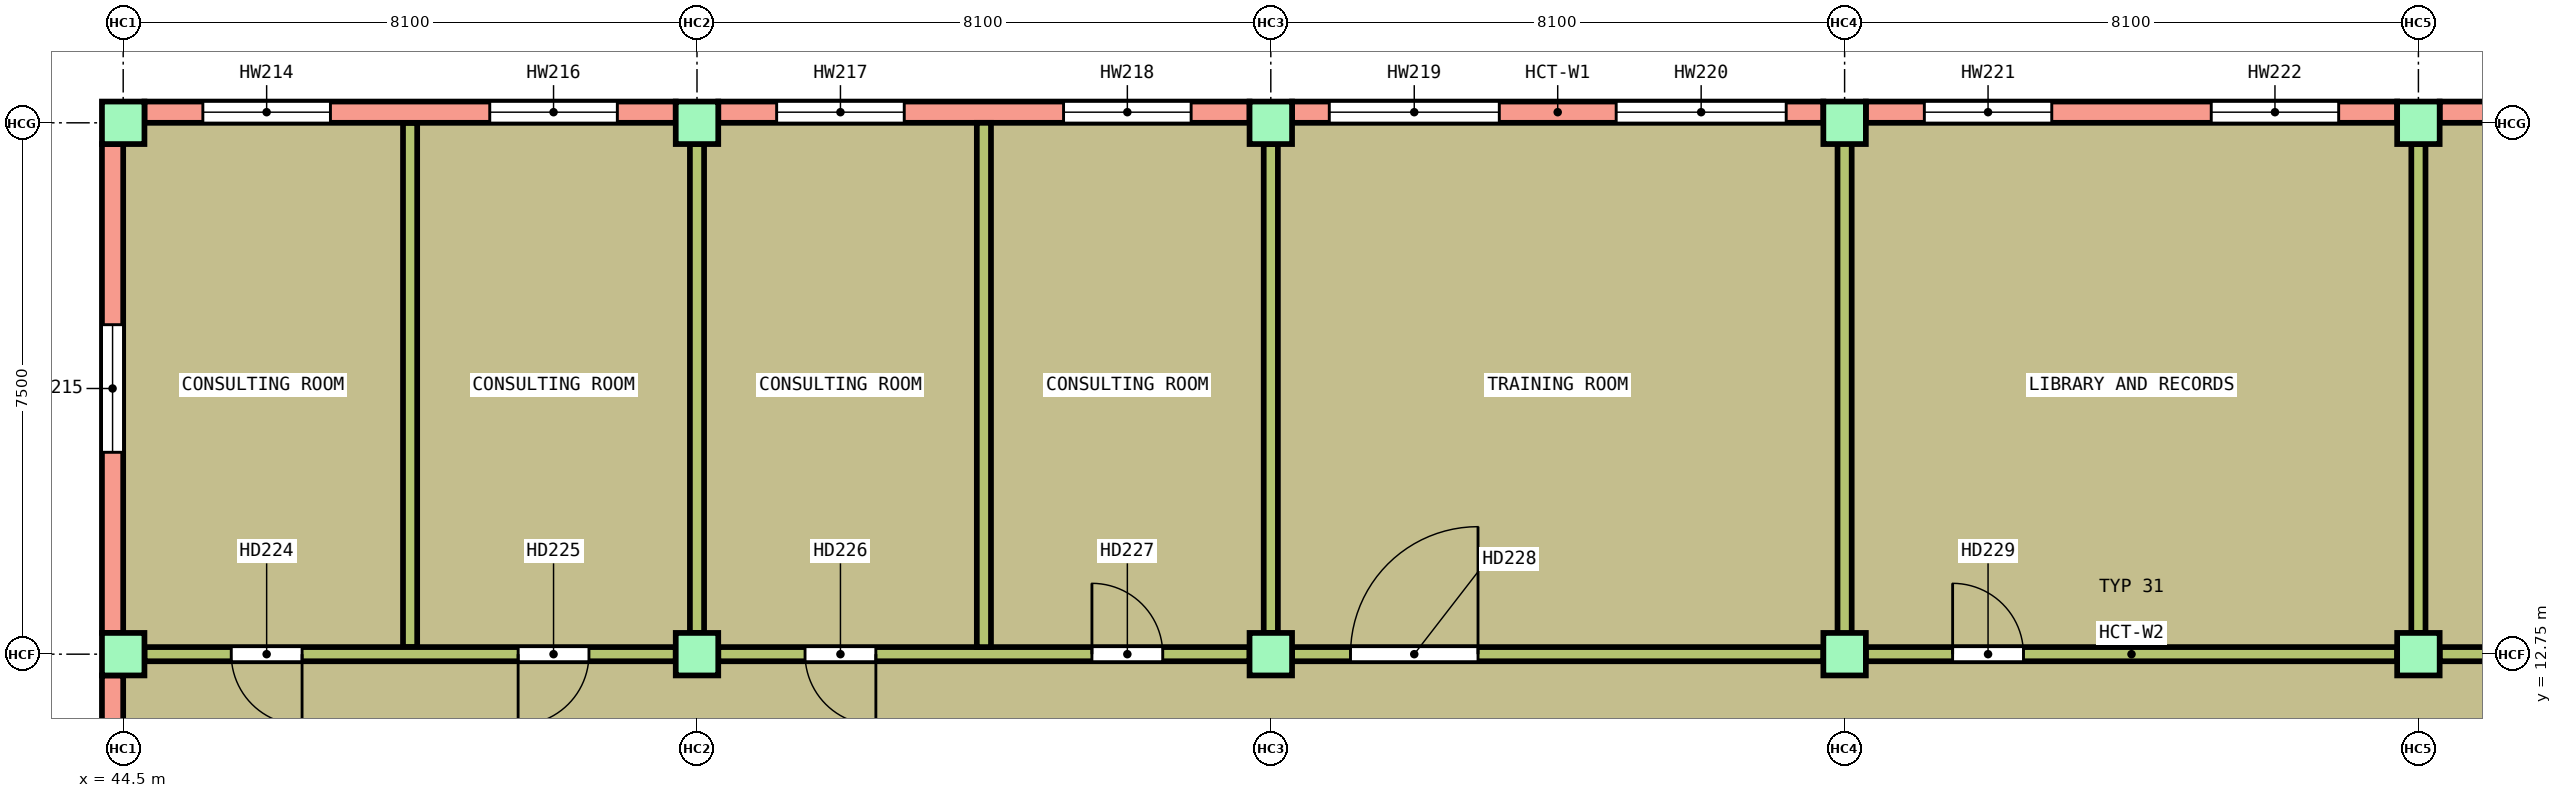
"""IFC4 building model, lengths in metres.
Left out: names, types, materials, properties, quantities, classifications, styles, units other than length and angle.
Written with IfcOpenShell. Run it as: python <this file> out.ifc"""

import sys

from ifc_helpers import new_model, si_unit, direction, frame, frame_2d, origin, origin_2d, place, context, subcontext, project, spatial, rectangle, extrude, element, fill, save


model = new_model("IFC4")
c1 = context("Model", 3, precision=1e-05, world=origin(), true_north=direction((0.0, 1.0)))
c2 = subcontext(c1, "Body", "Model", "MODEL_VIEW")
j1 = project(units=[si_unit("LENGTHUNIT", "METRE"), si_unit("PLANEANGLEUNIT", "RADIAN")], contexts=[c1])
p1 = place(None, origin())
s1 = spatial("IfcSite", under=j1, at=p1, CompositionType="ELEMENT")
p2 = place(p1, origin())
s2 = spatial("IfcBuilding", under=s1, at=p2, CompositionType="ELEMENT")
p3 = place(p2, frame((0.0, 0.0, 10.2)))
s3 = spatial("IfcBuildingStorey", under=s2, at=p3, CompositionType="ELEMENT", Elevation=10.2)
for number, where, z_axis, x_axis in (
    (1, (44.5, 12.75, 0.0), (0.0, 0.0, 1.0), (1.0, 0.0, 0.0)),
    (2, (52.6, 12.75, 0.0), (0.0, 0.0, 1.0), (1.0, 0.0, 0.0)),
    (3, (60.7, 12.75, 0.0), (0.0, 0.0, 1.0), (1.0, 0.0, 0.0)),
    (4, (68.8, 12.75, 0.0), (0.0, 0.0, 1.0), (1.0, 0.0, 0.0)),
    (5, (76.9, 12.75, 0.0), (0.0, 0.0, 1.0), (1.0, 0.0, 0.0)),
    (6, (44.5, 20.25, 0.0), (0.0, 0.0, 1.0), (1.0, 0.0, 0.0)),
    (7, (52.6, 20.25, 0.0), (0.0, 0.0, 1.0), (1.0, 0.0, 0.0)),
    (8, (60.7, 20.25, 0.0), (0.0, 0.0, 1.0), (1.0, 0.0, 0.0)),
    (9, (68.8, 20.25, 0.0), (0.0, 0.0, 1.0), (1.0, 0.0, 0.0)),
    (10, (76.9, 20.25, 0.0), (0.0, 0.0, 1.0), (1.0, 0.0, 0.0)),
):
    element("IfcColumn", number, at=place(p3, frame(where, z_axis=z_axis, x_axis=x_axis)), inside=s3, PredefinedType="COLUMN", context=c2, shape_type="SweptSolid", body=[
        extrude(rectangle(XDim=0.6, YDim=0.6, at=origin_2d()), origin(), (0.0, 0.0, 1.0), 4.15),
    ])
p4 = place(p3, frame((44.35, 10.05, 0.0), z_axis=(0.0, 0.0, 1.0), x_axis=(0.0, 1.0, 0.0)))
e11 = element("IfcWall", 11, at=p4, inside=s3, PredefinedType="SOLIDWALL", context=c2, shape_type="SweptSolid", body=[
    extrude(rectangle(XDim=2.4, YDim=0.3, at=frame_2d((1.2, 0.0))), origin(), (0.0, 0.0, 1.0), 3.6),
])
p5 = place(p3, frame((44.35, 13.05, 0.0), z_axis=(0.0, 0.0, 1.0), x_axis=(0.0, 1.0, 0.0)))
e12 = element("IfcWall", 12, at=p5, inside=s3, PredefinedType="SOLIDWALL", context=c2, shape_type="SweptSolid", body=[
    extrude(rectangle(XDim=6.9, YDim=0.3, at=frame_2d((3.45, 0.0))), origin(), (0.0, 0.0, 1.0), 3.6),
])
p6 = place(p5, frame((2.55, 0.0, 0.9)))
e13 = element("IfcOpeningElement", 13, at=p6, cuts=e12, PredefinedType="OPENING", context=c2, shape_type="SweptSolid", body=[
    extrude(rectangle(XDim=1.8, YDim=1.8, at=frame_2d((0.9, 0.9))), frame((0.0, 0.16, 0.0), z_axis=(0.0, -1.0, 0.0), x_axis=(1.0, 0.0, 0.0)), (0.0, 0.0, 1.0), 0.32),
])
p7 = place(p3, frame((48.55, 12.85, 0.0), z_axis=(0.0, 0.0, 1.0), x_axis=(0.0, 1.0, 0.0)))
e14 = element("IfcWall", 14, at=p7, inside=s3, PredefinedType="PARTITIONING", context=c2, shape_type="SweptSolid", body=[
    extrude(rectangle(XDim=7.4, YDim=0.2, at=frame_2d((3.7, 0.0))), origin(), (0.0, 0.0, 1.0), 3.6),
])
p8 = place(p3, frame((60.7, 13.05, 0.0), z_axis=(0.0, 0.0, 1.0), x_axis=(0.0, 1.0, 0.0)))
e15 = element("IfcWall", 15, at=p8, inside=s3, PredefinedType="PARTITIONING", context=c2, shape_type="SweptSolid", body=[
    extrude(rectangle(XDim=6.9, YDim=0.2, at=frame_2d((3.45, 0.0))), origin(), (0.0, 0.0, 1.0), 3.6),
])
p9 = place(p3, frame((68.8, 12.75, 0.0), z_axis=(0.0, 0.0, 1.0), x_axis=(0.0, 1.0, 0.0)))
e16 = element("IfcWall", 16, at=p9, inside=s3, PredefinedType="PARTITIONING", context=c2, shape_type="SweptSolid", body=[
    extrude(rectangle(XDim=7.5, YDim=0.2, at=frame_2d((3.75, 0.0))), origin(), (0.0, 0.0, 1.0), 3.6),
])
for number, where, z_axis, x_axis in (
    (17, (76.9, 13.05, 0.0), (0.0, 0.0, 1.0), (0.0, 1.0, 0.0)),
    (18, (52.6, 13.05, 0.0), (0.0, 0.0, 1.0), (0.0, 1.0, 0.0)),
):
    element("IfcWall", number, at=place(p3, frame(where, z_axis=z_axis, x_axis=x_axis)), inside=s3, PredefinedType="PARTITIONING", context=c2, shape_type="SweptSolid", body=[
        extrude(rectangle(XDim=6.9, YDim=0.2, at=frame_2d((3.45, 0.0))), origin(), (0.0, 0.0, 1.0), 3.6),
    ])
p10 = place(p3, frame((44.8, 12.75, 0.0), z_axis=(0.0, 0.0, 1.0), x_axis=(1.0, 0.0, 0.0)))
e19 = element("IfcWall", 19, at=p10, inside=s3, PredefinedType="PARTITIONING", context=c2, shape_type="SweptSolid", body=[
    extrude(rectangle(XDim=7.5, YDim=0.2, at=frame_2d((3.75, 0.0))), origin(), (0.0, 0.0, 1.0), 3.6),
])
p11 = place(p10, frame((1.225, 0.0, 0.0)))
e20 = element("IfcOpeningElement", 20, at=p11, cuts=e19, PredefinedType="OPENING", context=c2, shape_type="SweptSolid", body=[
    extrude(rectangle(XDim=1.0, YDim=2.1, at=frame_2d((0.5, 1.05))), frame((0.0, 0.11, 0.0), z_axis=(0.0, -1.0, 0.0), x_axis=(1.0, 0.0, 0.0)), (0.0, 0.0, 1.0), 0.22),
])
p12 = place(p10, frame((5.275, 0.0, 0.0)))
e21 = element("IfcOpeningElement", 21, at=p12, cuts=e19, PredefinedType="OPENING", context=c2, shape_type="SweptSolid", body=[
    extrude(rectangle(XDim=1.0, YDim=2.1, at=frame_2d((0.5, 1.05))), frame((0.0, 0.11, 0.0), z_axis=(0.0, -1.0, 0.0), x_axis=(1.0, 0.0, 0.0)), (0.0, 0.0, 1.0), 0.22),
])
p13 = place(p3, frame((52.9, 12.75, 0.0), z_axis=(0.0, 0.0, 1.0), x_axis=(1.0, 0.0, 0.0)))
e22 = element("IfcWall", 22, at=p13, inside=s3, PredefinedType="PARTITIONING", context=c2, shape_type="SweptSolid", body=[
    extrude(rectangle(XDim=7.5, YDim=0.2, at=frame_2d((3.75, 0.0))), origin(), (0.0, 0.0, 1.0), 3.6),
])
p14 = place(p13, frame((1.225, 0.0, 0.0)))
e23 = element("IfcOpeningElement", 23, at=p14, cuts=e22, PredefinedType="OPENING", context=c2, shape_type="SweptSolid", body=[
    extrude(rectangle(XDim=1.0, YDim=2.1, at=frame_2d((0.5, 1.05))), frame((0.0, 0.11, 0.0), z_axis=(0.0, -1.0, 0.0), x_axis=(1.0, 0.0, 0.0)), (0.0, 0.0, 1.0), 0.22),
])
p15 = place(p13, frame((5.275, 0.0, 0.0)))
e24 = element("IfcOpeningElement", 24, at=p15, cuts=e22, PredefinedType="OPENING", context=c2, shape_type="SweptSolid", body=[
    extrude(rectangle(XDim=1.0, YDim=2.1, at=frame_2d((0.5, 1.05))), frame((0.0, 0.11, 0.0), z_axis=(0.0, -1.0, 0.0), x_axis=(1.0, 0.0, 0.0)), (0.0, 0.0, 1.0), 0.22),
])
p16 = place(p3, frame((61.0, 12.75, 0.0), z_axis=(0.0, 0.0, 1.0), x_axis=(1.0, 0.0, 0.0)))
e25 = element("IfcWall", 25, at=p16, inside=s3, PredefinedType="PARTITIONING", context=c2, shape_type="SweptSolid", body=[
    extrude(rectangle(XDim=7.5, YDim=0.2, at=frame_2d((3.75, 0.0))), origin(), (0.0, 0.0, 1.0), 3.6),
])
p17 = place(p16, frame((0.825, 0.0, 0.0)))
e26 = element("IfcOpeningElement", 26, at=p17, cuts=e25, PredefinedType="OPENING", context=c2, shape_type="SweptSolid", body=[
    extrude(rectangle(XDim=1.8, YDim=2.1, at=frame_2d((0.9, 1.05))), frame((0.0, 0.11, 0.0), z_axis=(0.0, -1.0, 0.0), x_axis=(1.0, 0.0, 0.0)), (0.0, 0.0, 1.0), 0.22),
])
p18 = place(p3, frame((69.1, 12.75, 0.0), z_axis=(0.0, 0.0, 1.0), x_axis=(1.0, 0.0, 0.0)))
e27 = element("IfcWall", 27, at=p18, inside=s3, PredefinedType="PARTITIONING", context=c2, shape_type="SweptSolid", body=[
    extrude(rectangle(XDim=7.5, YDim=0.2, at=frame_2d((3.75, 0.0))), origin(), (0.0, 0.0, 1.0), 3.6),
])
p19 = place(p18, frame((1.225, 0.0, 0.0)))
e28 = element("IfcOpeningElement", 28, at=p19, cuts=e27, PredefinedType="OPENING", context=c2, shape_type="SweptSolid", body=[
    extrude(rectangle(XDim=1.0, YDim=2.1, at=frame_2d((0.5, 1.05))), frame((0.0, 0.11, 0.0), z_axis=(0.0, -1.0, 0.0), x_axis=(1.0, 0.0, 0.0)), (0.0, 0.0, 1.0), 0.22),
])
p20 = place(p3, frame((77.2, 12.75, 0.0), z_axis=(0.0, 0.0, 1.0), x_axis=(1.0, 0.0, 0.0)))
e29 = element("IfcWall", 29, at=p20, inside=s3, PredefinedType="PARTITIONING", context=c2, shape_type="SweptSolid", body=[
    extrude(rectangle(XDim=7.5, YDim=0.2, at=frame_2d((3.75, 0.0))), origin(), (0.0, 0.0, 1.0), 3.6),
])
p21 = place(p20, frame((1.225, 0.0, 0.0)))
e30 = element("IfcOpeningElement", 30, at=p21, cuts=e29, PredefinedType="OPENING", context=c2, shape_type="SweptSolid", body=[
    extrude(rectangle(XDim=1.0, YDim=2.1, at=frame_2d((0.5, 1.05))), frame((0.0, 0.11, 0.0), z_axis=(0.0, -1.0, 0.0), x_axis=(1.0, 0.0, 0.0)), (0.0, 0.0, 1.0), 0.22),
])
p22 = place(p3, frame((44.8, 20.4, 0.0), z_axis=(0.0, 0.0, 1.0), x_axis=(1.0, 0.0, 0.0)))
e31 = element("IfcWall", 31, at=p22, inside=s3, PredefinedType="SOLIDWALL", context=c2, shape_type="SweptSolid", body=[
    extrude(rectangle(XDim=7.5, YDim=0.3, at=frame_2d((3.75, 0.0))), origin(), (0.0, 0.0, 1.0), 3.6),
])
p23 = place(p22, frame((0.825, 0.0, 0.9)))
e32 = element("IfcOpeningElement", 32, at=p23, cuts=e31, PredefinedType="OPENING", context=c2, shape_type="SweptSolid", body=[
    extrude(rectangle(XDim=1.8, YDim=1.8, at=frame_2d((0.9, 0.9))), frame((0.0, 0.16, 0.0), z_axis=(0.0, -1.0, 0.0), x_axis=(1.0, 0.0, 0.0)), (0.0, 0.0, 1.0), 0.32),
])
p24 = place(p22, frame((4.875, 0.0, 0.9)))
e33 = element("IfcOpeningElement", 33, at=p24, cuts=e31, PredefinedType="OPENING", context=c2, shape_type="SweptSolid", body=[
    extrude(rectangle(XDim=1.8, YDim=1.8, at=frame_2d((0.9, 0.9))), frame((0.0, 0.16, 0.0), z_axis=(0.0, -1.0, 0.0), x_axis=(1.0, 0.0, 0.0)), (0.0, 0.0, 1.0), 0.32),
])
p25 = place(p3, frame((52.9, 20.4, 0.0), z_axis=(0.0, 0.0, 1.0), x_axis=(1.0, 0.0, 0.0)))
e34 = element("IfcWall", 34, at=p25, inside=s3, PredefinedType="SOLIDWALL", context=c2, shape_type="SweptSolid", body=[
    extrude(rectangle(XDim=7.5, YDim=0.3, at=frame_2d((3.75, 0.0))), origin(), (0.0, 0.0, 1.0), 3.6),
])
p26 = place(p25, frame((0.825, 0.0, 0.9)))
e35 = element("IfcOpeningElement", 35, at=p26, cuts=e34, PredefinedType="OPENING", context=c2, shape_type="SweptSolid", body=[
    extrude(rectangle(XDim=1.8, YDim=1.8, at=frame_2d((0.9, 0.9))), frame((0.0, 0.16, 0.0), z_axis=(0.0, -1.0, 0.0), x_axis=(1.0, 0.0, 0.0)), (0.0, 0.0, 1.0), 0.32),
])
p27 = place(p25, frame((4.875, 0.0, 0.9)))
e36 = element("IfcOpeningElement", 36, at=p27, cuts=e34, PredefinedType="OPENING", context=c2, shape_type="SweptSolid", body=[
    extrude(rectangle(XDim=1.8, YDim=1.8, at=frame_2d((0.9, 0.9))), frame((0.0, 0.16, 0.0), z_axis=(0.0, -1.0, 0.0), x_axis=(1.0, 0.0, 0.0)), (0.0, 0.0, 1.0), 0.32),
])
p28 = place(p3, frame((61.0, 20.4, 0.0), z_axis=(0.0, 0.0, 1.0), x_axis=(1.0, 0.0, 0.0)))
e37 = element("IfcWall", 37, at=p28, inside=s3, PredefinedType="SOLIDWALL", context=c2, shape_type="SweptSolid", body=[
    extrude(rectangle(XDim=7.5, YDim=0.3, at=frame_2d((3.75, 0.0))), origin(), (0.0, 0.0, 1.0), 3.6),
])
p29 = place(p28, frame((0.525, 0.0, 0.3)))
e38 = element("IfcOpeningElement", 38, at=p29, cuts=e37, PredefinedType="OPENING", context=c2, shape_type="SweptSolid", body=[
    extrude(rectangle(XDim=2.4, YDim=2.4, at=frame_2d((1.2, 1.2))), frame((0.0, 0.16, 0.0), z_axis=(0.0, -1.0, 0.0), x_axis=(1.0, 0.0, 0.0)), (0.0, 0.0, 1.0), 0.32),
])
p30 = place(p28, frame((4.575, 0.0, 0.3)))
e39 = element("IfcOpeningElement", 39, at=p30, cuts=e37, PredefinedType="OPENING", context=c2, shape_type="SweptSolid", body=[
    extrude(rectangle(XDim=2.4, YDim=2.4, at=frame_2d((1.2, 1.2))), frame((0.0, 0.16, 0.0), z_axis=(0.0, -1.0, 0.0), x_axis=(1.0, 0.0, 0.0)), (0.0, 0.0, 1.0), 0.32),
])
p31 = place(p3, frame((69.1, 20.4, 0.0), z_axis=(0.0, 0.0, 1.0), x_axis=(1.0, 0.0, 0.0)))
e40 = element("IfcWall", 40, at=p31, inside=s3, PredefinedType="SOLIDWALL", context=c2, shape_type="SweptSolid", body=[
    extrude(rectangle(XDim=7.5, YDim=0.3, at=frame_2d((3.75, 0.0))), origin(), (0.0, 0.0, 1.0), 3.6),
])
p32 = place(p31, frame((0.825, 0.0, 0.9)))
e41 = element("IfcOpeningElement", 41, at=p32, cuts=e40, PredefinedType="OPENING", context=c2, shape_type="SweptSolid", body=[
    extrude(rectangle(XDim=1.8, YDim=1.8, at=frame_2d((0.9, 0.9))), frame((0.0, 0.16, 0.0), z_axis=(0.0, -1.0, 0.0), x_axis=(1.0, 0.0, 0.0)), (0.0, 0.0, 1.0), 0.32),
])
p33 = place(p31, frame((4.875, 0.0, 0.9)))
e42 = element("IfcOpeningElement", 42, at=p33, cuts=e40, PredefinedType="OPENING", context=c2, shape_type="SweptSolid", body=[
    extrude(rectangle(XDim=1.8, YDim=1.8, at=frame_2d((0.9, 0.9))), frame((0.0, 0.16, 0.0), z_axis=(0.0, -1.0, 0.0), x_axis=(1.0, 0.0, 0.0)), (0.0, 0.0, 1.0), 0.32),
])
p34 = place(p3, frame((77.2, 20.4, 0.0), z_axis=(0.0, 0.0, 1.0), x_axis=(1.0, 0.0, 0.0)))
e43 = element("IfcWall", 43, at=p34, inside=s3, PredefinedType="SOLIDWALL", context=c2, shape_type="SweptSolid", body=[
    extrude(rectangle(XDim=7.5, YDim=0.3, at=frame_2d((3.75, 0.0))), origin(), (0.0, 0.0, 1.0), 3.6),
])
p35 = place(p34, frame((0.825, 0.0, 0.9)))
e44 = element("IfcOpeningElement", 44, at=p35, cuts=e43, PredefinedType="OPENING", context=c2, shape_type="SweptSolid", body=[
    extrude(rectangle(XDim=1.8, YDim=1.8, at=frame_2d((0.9, 0.9))), frame((0.0, 0.16, 0.0), z_axis=(0.0, -1.0, 0.0), x_axis=(1.0, 0.0, 0.0)), (0.0, 0.0, 1.0), 0.32),
])
p36 = place(p34, frame((4.875, 0.0, 0.9)))
e45 = element("IfcOpeningElement", 45, at=p36, cuts=e43, PredefinedType="OPENING", context=c2, shape_type="SweptSolid", body=[
    extrude(rectangle(XDim=1.8, YDim=1.8, at=frame_2d((0.9, 0.9))), frame((0.0, 0.16, 0.0), z_axis=(0.0, -1.0, 0.0), x_axis=(1.0, 0.0, 0.0)), (0.0, 0.0, 1.0), 0.32),
])
p37 = place(p3, frame((56.65, 12.85, 0.0), z_axis=(0.0, 0.0, 1.0), x_axis=(0.0, 1.0, 0.0)))
e46 = element("IfcWall", 46, at=p37, inside=s3, PredefinedType="PARTITIONING", context=c2, shape_type="SweptSolid", body=[
    extrude(rectangle(XDim=7.4, YDim=0.2, at=frame_2d((3.7, 0.0))), origin(), (0.0, 0.0, 1.0), 3.6),
])
p38 = place(p11, origin())
e47 = element("IfcDoor", 47, at=p38, inside=s3, OperationType="SINGLE_SWING_RIGHT", PredefinedType="DOOR", context=c2, shape_type="SweptSolid", body=[
    extrude(rectangle(XDim=1.0, YDim=2.1, at=frame_2d((0.5, 1.05))), frame((0.0, 0.025, 0.0), z_axis=(0.0, -1.0, 0.0), x_axis=(1.0, 0.0, 0.0)), (0.0, 0.0, 1.0), 0.05),
])
fill(e20, e47)
p39 = place(p12, origin())
e48 = element("IfcDoor", 48, at=p39, inside=s3, OperationType="SINGLE_SWING_LEFT", PredefinedType="DOOR", context=c2, shape_type="SweptSolid", body=[
    extrude(rectangle(XDim=1.0, YDim=2.1, at=frame_2d((0.5, 1.05))), frame((0.0, 0.025, 0.0), z_axis=(0.0, -1.0, 0.0), x_axis=(1.0, 0.0, 0.0)), (0.0, 0.0, 1.0), 0.05),
])
fill(e21, e48)
p40 = place(p14, origin())
e49 = element("IfcDoor", 49, at=p40, inside=s3, OperationType="SINGLE_SWING_RIGHT", PredefinedType="DOOR", context=c2, shape_type="SweptSolid", body=[
    extrude(rectangle(XDim=1.0, YDim=2.1, at=frame_2d((0.5, 1.05))), frame((0.0, 0.025, 0.0), z_axis=(0.0, -1.0, 0.0), x_axis=(1.0, 0.0, 0.0)), (0.0, 0.0, 1.0), 0.05),
])
fill(e23, e49)
p41 = place(p15, origin())
e50 = element("IfcDoor", 50, at=p41, inside=s3, OperationType="SINGLE_SWING_LEFT", PredefinedType="DOOR", context=c2, shape_type="SweptSolid", body=[
    extrude(rectangle(XDim=1.0, YDim=2.1, at=frame_2d((0.5, 1.05))), frame((0.0, 0.025, 0.0), z_axis=(0.0, -1.0, 0.0), x_axis=(1.0, 0.0, 0.0)), (0.0, 0.0, 1.0), 0.05),
])
fill(e24, e50)
p42 = place(p17, origin())
e51 = element("IfcDoor", 51, at=p42, inside=s3, OperationType="DOUBLE_DOOR_SINGLE_SWING", PredefinedType="DOOR", context=c2, shape_type="SweptSolid", body=[
    extrude(rectangle(XDim=1.8, YDim=2.1, at=frame_2d((0.9, 1.05))), frame((0.0, 0.025, 0.0), z_axis=(0.0, -1.0, 0.0), x_axis=(1.0, 0.0, 0.0)), (0.0, 0.0, 1.0), 0.05),
])
fill(e26, e51)
p43 = place(p19, origin())
e52 = element("IfcDoor", 52, at=p43, inside=s3, OperationType="SINGLE_SWING_LEFT", PredefinedType="DOOR", context=c2, shape_type="SweptSolid", body=[
    extrude(rectangle(XDim=1.0, YDim=2.1, at=frame_2d((0.5, 1.05))), frame((0.0, 0.025, 0.0), z_axis=(0.0, -1.0, 0.0), x_axis=(1.0, 0.0, 0.0)), (0.0, 0.0, 1.0), 0.05),
])
fill(e28, e52)
p44 = place(p23, origin())
e53 = element("IfcWindow", 53, at=p44, inside=s3, PartitioningType="SINGLE_PANEL", PredefinedType="WINDOW", context=c2, shape_type="SweptSolid", body=[
    extrude(rectangle(XDim=1.8, YDim=1.8, at=frame_2d((0.9, 0.9))), frame((0.0, 0.03, 0.0), z_axis=(0.0, -1.0, 0.0), x_axis=(1.0, 0.0, 0.0)), (0.0, 0.0, 1.0), 0.06),
])
fill(e32, e53)
p45 = place(p6, origin())
e54 = element("IfcWindow", 54, at=p45, inside=s3, PartitioningType="SINGLE_PANEL", PredefinedType="WINDOW", context=c2, shape_type="SweptSolid", body=[
    extrude(rectangle(XDim=1.8, YDim=1.8, at=frame_2d((0.9, 0.9))), frame((0.0, 0.03, 0.0), z_axis=(0.0, -1.0, 0.0), x_axis=(1.0, 0.0, 0.0)), (0.0, 0.0, 1.0), 0.06),
])
fill(e13, e54)
p46 = place(p24, origin())
e55 = element("IfcWindow", 55, at=p46, inside=s3, PartitioningType="SINGLE_PANEL", PredefinedType="WINDOW", context=c2, shape_type="SweptSolid", body=[
    extrude(rectangle(XDim=1.8, YDim=1.8, at=frame_2d((0.9, 0.9))), frame((0.0, 0.03, 0.0), z_axis=(0.0, -1.0, 0.0), x_axis=(1.0, 0.0, 0.0)), (0.0, 0.0, 1.0), 0.06),
])
fill(e33, e55)
p47 = place(p26, origin())
e56 = element("IfcWindow", 56, at=p47, inside=s3, PartitioningType="SINGLE_PANEL", PredefinedType="WINDOW", context=c2, shape_type="SweptSolid", body=[
    extrude(rectangle(XDim=1.8, YDim=1.8, at=frame_2d((0.9, 0.9))), frame((0.0, 0.03, 0.0), z_axis=(0.0, -1.0, 0.0), x_axis=(1.0, 0.0, 0.0)), (0.0, 0.0, 1.0), 0.06),
])
fill(e35, e56)
p48 = place(p27, origin())
e57 = element("IfcWindow", 57, at=p48, inside=s3, PartitioningType="SINGLE_PANEL", PredefinedType="WINDOW", context=c2, shape_type="SweptSolid", body=[
    extrude(rectangle(XDim=1.8, YDim=1.8, at=frame_2d((0.9, 0.9))), frame((0.0, 0.03, 0.0), z_axis=(0.0, -1.0, 0.0), x_axis=(1.0, 0.0, 0.0)), (0.0, 0.0, 1.0), 0.06),
])
fill(e36, e57)
p49 = place(p29, origin())
e58 = element("IfcWindow", 58, at=p49, inside=s3, PartitioningType="DOUBLE_PANEL_VERTICAL", PredefinedType="WINDOW", context=c2, shape_type="SweptSolid", body=[
    extrude(rectangle(XDim=2.4, YDim=2.4, at=frame_2d((1.2, 1.2))), frame((0.0, 0.03, 0.0), z_axis=(0.0, -1.0, 0.0), x_axis=(1.0, 0.0, 0.0)), (0.0, 0.0, 1.0), 0.06),
])
fill(e38, e58)
p50 = place(p30, origin())
e59 = element("IfcWindow", 59, at=p50, inside=s3, PartitioningType="DOUBLE_PANEL_VERTICAL", PredefinedType="WINDOW", context=c2, shape_type="SweptSolid", body=[
    extrude(rectangle(XDim=2.4, YDim=2.4, at=frame_2d((1.2, 1.2))), frame((0.0, 0.03, 0.0), z_axis=(0.0, -1.0, 0.0), x_axis=(1.0, 0.0, 0.0)), (0.0, 0.0, 1.0), 0.06),
])
fill(e39, e59)
p51 = place(p32, origin())
e60 = element("IfcWindow", 60, at=p51, inside=s3, PartitioningType="SINGLE_PANEL", PredefinedType="WINDOW", context=c2, shape_type="SweptSolid", body=[
    extrude(rectangle(XDim=1.8, YDim=1.8, at=frame_2d((0.9, 0.9))), frame((0.0, 0.03, 0.0), z_axis=(0.0, -1.0, 0.0), x_axis=(1.0, 0.0, 0.0)), (0.0, 0.0, 1.0), 0.06),
])
fill(e41, e60)
p52 = place(p33, origin())
e61 = element("IfcWindow", 61, at=p52, inside=s3, PartitioningType="SINGLE_PANEL", PredefinedType="WINDOW", context=c2, shape_type="SweptSolid", body=[
    extrude(rectangle(XDim=1.8, YDim=1.8, at=frame_2d((0.9, 0.9))), frame((0.0, 0.03, 0.0), z_axis=(0.0, -1.0, 0.0), x_axis=(1.0, 0.0, 0.0)), (0.0, 0.0, 1.0), 0.06),
])
fill(e42, e61)
save(model, sys.argv[1])
